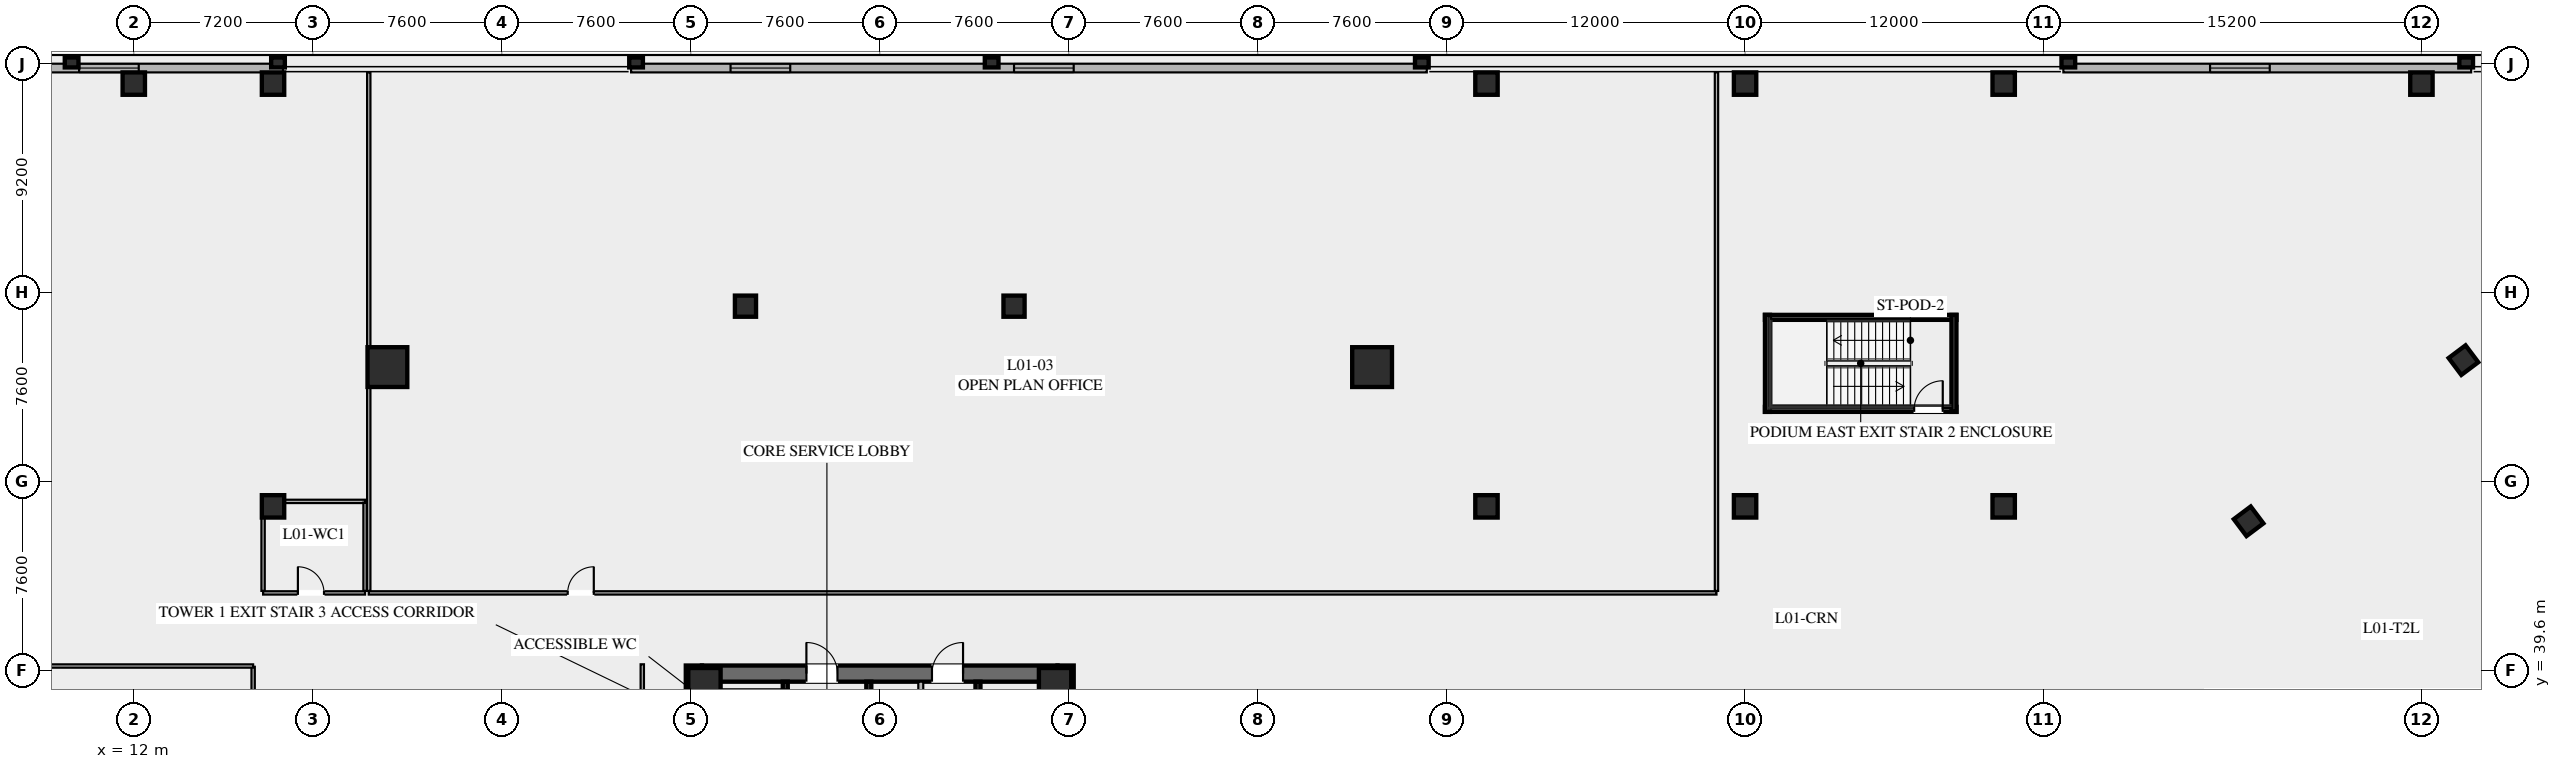
"""IFC4 building model, lengths in metres.
Left out: names, types, materials, properties, quantities, classifications, styles, units other than length and angle.
Written with IfcOpenShell. Run it as: python <this file> out.ifc"""

import sys

from ifc_helpers import new_model, si_unit, direction, frame, frame_2d, origin, origin_2d, place, context, subcontext, project, spatial, rectangle, hollow_rectangle, extrude, element, fill, save


model = new_model("IFC4")
c1 = context("Model", 3, precision=1e-05, world=origin(), true_north=direction((0.0, 1.0)))
c2 = subcontext(c1, "Body", "Model", "MODEL_VIEW")
j1 = project(units=[si_unit("LENGTHUNIT", "METRE"), si_unit("PLANEANGLEUNIT", "RADIAN")], contexts=[c1])
p1 = place(None, origin())
s1 = spatial("IfcSite", under=j1, at=p1, CompositionType="ELEMENT")
p2 = place(p1, origin())
s2 = spatial("IfcBuilding", under=s1, at=p2, CompositionType="ELEMENT")
p3 = place(p2, frame((0.0, 0.0, 5.4)))
s3 = spatial("IfcBuildingStorey", under=s2, at=p3, CompositionType="ELEMENT", Elevation=5.4)
for number, where, z_axis, x_axis in (
    (1, (34.525, 24.2, 0.0), (0.0, 0.0, 1.0), (0.0, 1.0, 0.0)),
    (2, (49.475, 39.8, 0.0), (0.0, 0.0, 1.0), (0.0, -1.0, 0.0)),
):
    element("IfcWall", number, at=place(p3, frame(where, z_axis=z_axis, x_axis=x_axis)), inside=s3, PredefinedType="SHEAR", context=c2, shape_type="SweptSolid", body=[
        extrude(rectangle(XDim=15.6, YDim=0.65, at=frame_2d((7.8, 0.0))), origin(), (0.0, 0.0, 1.0), 4.8),
    ])
p4 = place(p3, frame((34.85, 39.475, 0.0), z_axis=(0.0, 0.0, 1.0), x_axis=(1.0, 0.0, 0.0)))
e3 = element("IfcWall", 3, at=p4, inside=s3, PredefinedType="SHEAR", context=c2, shape_type="SweptSolid", body=[
    extrude(rectangle(XDim=14.3, YDim=0.65, at=frame_2d((7.15, 0.0))), origin(), (0.0, 0.0, 1.0), 4.8),
])
p5 = place(p4, frame((4.2, 0.0, 0.0)))
e4 = element("IfcOpeningElement", 4, at=p5, cuts=e3, PredefinedType="OPENING", context=c2, shape_type="SweptSolid", body=[
    extrude(rectangle(XDim=1.25, YDim=2.25, at=frame_2d((0.625, 1.125))), frame((0.0, 0.335, 0.0), z_axis=(0.0, -1.0, 0.0), x_axis=(1.0, 0.0, 0.0)), (0.0, 0.0, 1.0), 0.67),
])
p6 = place(p4, frame((9.25, 0.0, 0.0)))
e5 = element("IfcOpeningElement", 5, at=p6, cuts=e3, PredefinedType="OPENING", context=c2, shape_type="SweptSolid", body=[
    extrude(rectangle(XDim=1.25, YDim=2.25, at=frame_2d((0.625, 1.125))), frame((0.0, 0.335, 0.0), z_axis=(0.0, -1.0, 0.0), x_axis=(1.0, 0.0, 0.0)), (0.0, 0.0, 1.0), 0.67),
])
for number, where, z_axis, x_axis in (
    (6, (49.05, 39.05, 0.0), (0.0, 0.0, 1.0), (1.0, 0.0, 0.0)),
    (7, (34.95, 39.05, 0.0), (0.0, 0.0, 1.0), (1.0, 0.0, 0.0)),
):
    element("IfcColumn", number, at=place(p3, frame(where, z_axis=z_axis, x_axis=x_axis)), inside=s3, PredefinedType="COLUMN", context=c2, shape_type="SweptSolid", body=[
        extrude(hollow_rectangle(XDim=1.3, YDim=1.3, WallThickness=0.05, at=origin_2d()), origin(), (0.0, 0.0, 1.0), 4.54),
    ])
for number, where, z_axis, x_axis in (
    (8, (61.8, 51.8, 0.0), (0.0, 0.0, 1.0), (1.0, 0.0, 0.0)),
    (9, (22.2, 51.8, 0.0), (0.0, 0.0, 1.0), (1.0, 0.0, 0.0)),
):
    element("IfcColumn", number, at=place(p3, frame(where, z_axis=z_axis, x_axis=x_axis)), inside=s3, PredefinedType="COLUMN", context=c2, shape_type="SweptSolid", body=[
        extrude(hollow_rectangle(XDim=1.6, YDim=1.6, WallThickness=0.06, at=origin_2d()), origin(), (0.0, 0.0, 1.0), 4.54),
    ])
for number, where, z_axis, x_axis in (
    (10, (47.4, 54.25, 0.0), (0.0, 0.0, 1.0), (1.0, 0.0, 0.0)),
    (11, (36.6, 54.25, 0.0), (0.0, 0.0, 1.0), (1.0, 0.0, 0.0)),
):
    element("IfcColumn", number, at=place(p3, frame(where, z_axis=z_axis, x_axis=x_axis)), inside=s3, PredefinedType="COLUMN", context=c2, shape_type="SweptSolid", body=[
        extrude(hollow_rectangle(XDim=0.85, YDim=0.85, WallThickness=0.035, at=origin_2d()), origin(), (0.0, 0.0, 1.0), 4.54),
    ])
p7 = place(p3, frame((103.571, 33.522, 0.0), z_axis=(0.0, 0.0, 1.0), x_axis=(0.799998028465, 0.600002628705, 0.0)))
e12 = element("IfcWall", 12, at=p7, inside=s3, PredefinedType="SHEAR", context=c2, shape_type="SweptSolid", body=[
    extrude(rectangle(XDim=14.86, YDim=0.65, at=frame_2d((7.43, 0.0))), origin(), (0.0, 0.0, 1.0), 4.8),
])
p8 = place(p7, frame((4.48, 0.0, 0.0)))
e13 = element("IfcOpeningElement", 13, at=p8, cuts=e12, PredefinedType="OPENING", context=c2, shape_type="SweptSolid", body=[
    extrude(rectangle(XDim=1.25, YDim=2.25, at=frame_2d((0.625, 1.125))), frame((0.0, 0.335, 0.0), z_axis=(0.0, -1.0, 0.0), x_axis=(1.0, 0.0, 0.0)), (0.0, 0.0, 1.0), 0.67),
])
p9 = place(p7, frame((9.53, 0.0, 0.0)))
e14 = element("IfcOpeningElement", 14, at=p9, cuts=e12, PredefinedType="OPENING", context=c2, shape_type="SweptSolid", body=[
    extrude(rectangle(XDim=1.25, YDim=2.25, at=frame_2d((0.625, 1.125))), frame((0.0, 0.335, 0.0), z_axis=(0.0, -1.0, 0.0), x_axis=(1.0, 0.0, 0.0)), (0.0, 0.0, 1.0), 0.67),
])
for number, where, z_axis, x_axis in (
    (15, (105.69, 52.08, 0.0), (0.0, 0.0, 1.0), (0.8, 0.6, 0.0)),
    (16, (97.05, 45.6, 0.0), (0.0, 0.0, 1.0), (0.8, 0.6, 0.0)),
):
    element("IfcColumn", number, at=place(p3, frame(where, z_axis=z_axis, x_axis=x_axis)), inside=s3, PredefinedType="COLUMN", context=c2, shape_type="SweptSolid", body=[
        extrude(hollow_rectangle(XDim=0.85, YDim=0.85, WallThickness=0.035, at=origin_2d()), origin(), (0.0, 0.0, 1.0), 4.54),
    ])
for number, where, z_axis, x_axis in (
    (17, (12.0, 63.2, 0.0), (0.0, 0.0, 1.0), (1.0, 0.0, 0.0)),
    (18, (17.6, 63.2, 0.0), (0.0, 0.0, 1.0), (1.0, 0.0, 0.0)),
    (19, (66.4, 63.2, 0.0), (0.0, 0.0, 1.0), (1.0, 0.0, 0.0)),
    (20, (76.8, 63.2, 0.0), (0.0, 0.0, 1.0), (1.0, 0.0, 0.0)),
    (21, (87.2, 63.2, 0.0), (0.0, 0.0, 1.0), (1.0, 0.0, 0.0)),
    (22, (104.0, 63.2, 0.0), (0.0, 0.0, 1.0), (1.0, 0.0, 0.0)),
    (23, (17.6, 46.2, 0.0), (0.0, 0.0, 1.0), (1.0, 0.0, 0.0)),
    (24, (66.4, 46.2, 0.0), (0.0, 0.0, 1.0), (1.0, 0.0, 0.0)),
    (25, (76.8, 46.2, 0.0), (0.0, 0.0, 1.0), (1.0, 0.0, 0.0)),
    (26, (87.2, 46.2, 0.0), (0.0, 0.0, 1.0), (1.0, 0.0, 0.0)),
):
    element("IfcColumn", number, at=place(p3, frame(where, z_axis=z_axis, x_axis=x_axis)), inside=s3, PredefinedType="COLUMN", context=c2, shape_type="SweptSolid", body=[
        extrude(rectangle(XDim=0.9, YDim=0.9, at=origin_2d()), origin(), (0.0, 0.0, 1.0), 4.54),
    ])
p10 = place(p3, frame((0.0, 63.825, 0.0), z_axis=(0.0, 0.0, 1.0), x_axis=(1.0, 0.0, 0.0)))
e27 = element("IfcWall", 27, at=p10, inside=s3, PredefinedType="SOLIDWALL", context=c2, shape_type="SweptSolid", body=[
    extrude(rectangle(XDim=18.0, YDim=0.35, at=frame_2d((9.0, 0.0))), origin(), (0.0, 0.0, 1.0), 4.54),
])
p11 = place(p10, frame((4.2, 0.0, 0.95)))
e28 = element("IfcOpeningElement", 28, at=p11, cuts=e27, PredefinedType="OPENING", context=c2, shape_type="SweptSolid", body=[
    extrude(rectangle(XDim=2.4, YDim=2.2, at=frame_2d((1.2, 1.1))), frame((0.0, 0.185, 0.0), z_axis=(0.0, -1.0, 0.0), x_axis=(1.0, 0.0, 0.0)), (0.0, 0.0, 1.0), 0.37),
])
p12 = place(p10, frame((9.8, 0.0, 0.95)))
e29 = element("IfcOpeningElement", 29, at=p12, cuts=e27, PredefinedType="OPENING", context=c2, shape_type="SweptSolid", body=[
    extrude(rectangle(XDim=2.4, YDim=2.2, at=frame_2d((1.2, 1.1))), frame((0.0, 0.185, 0.0), z_axis=(0.0, -1.0, 0.0), x_axis=(1.0, 0.0, 0.0)), (0.0, 0.0, 1.0), 0.37),
])
p13 = place(p3, frame((32.0, 63.825, 0.0), z_axis=(0.0, 0.0, 1.0), x_axis=(1.0, 0.0, 0.0)))
e30 = element("IfcWall", 30, at=p13, inside=s3, PredefinedType="SOLIDWALL", context=c2, shape_type="SweptSolid", body=[
    extrude(rectangle(XDim=32.0, YDim=0.35, at=frame_2d((16.0, 0.0))), origin(), (0.0, 0.0, 1.0), 4.54),
])
p14 = place(p13, frame((4.0, 0.0, 0.95)))
e31 = element("IfcOpeningElement", 31, at=p14, cuts=e30, PredefinedType="OPENING", context=c2, shape_type="SweptSolid", body=[
    extrude(rectangle(XDim=2.4, YDim=2.2, at=frame_2d((1.2, 1.1))), frame((0.0, 0.185, 0.0), z_axis=(0.0, -1.0, 0.0), x_axis=(1.0, 0.0, 0.0)), (0.0, 0.0, 1.0), 0.37),
])
p15 = place(p13, frame((15.4, 0.0, 0.95)))
e32 = element("IfcOpeningElement", 32, at=p15, cuts=e30, PredefinedType="OPENING", context=c2, shape_type="SweptSolid", body=[
    extrude(rectangle(XDim=2.4, YDim=2.2, at=frame_2d((1.2, 1.1))), frame((0.0, 0.185, 0.0), z_axis=(0.0, -1.0, 0.0), x_axis=(1.0, 0.0, 0.0)), (0.0, 0.0, 1.0), 0.37),
])
p16 = place(p3, frame((89.6, 63.825, 0.0), z_axis=(0.0, 0.0, 1.0), x_axis=(1.0, 0.0, 0.0)))
e33 = element("IfcWall", 33, at=p16, inside=s3, PredefinedType="SOLIDWALL", context=c2, shape_type="SweptSolid", body=[
    extrude(rectangle(XDim=16.4, YDim=0.35, at=frame_2d((8.2, 0.0))), origin(), (0.0, 0.0, 1.0), 4.54),
])
p17 = place(p16, frame((5.9, 0.0, 0.95)))
e34 = element("IfcOpeningElement", 34, at=p17, cuts=e33, PredefinedType="OPENING", context=c2, shape_type="SweptSolid", body=[
    extrude(rectangle(XDim=2.4, YDim=2.2, at=frame_2d((1.2, 1.1))), frame((0.0, 0.185, 0.0), z_axis=(0.0, -1.0, 0.0), x_axis=(1.0, 0.0, 0.0)), (0.0, 0.0, 1.0), 0.37),
])
for number, where, z_axis, x_axis in (
    (35, (9.5, 64.05, 0.0), (0.0, 0.0, 1.0), (1.0, 0.0, 0.0)),
    (36, (17.8, 64.05, 0.0), (0.0, 0.0, 1.0), (1.0, 0.0, 0.0)),
    (37, (32.2, 64.05, 0.0), (0.0, 0.0, 1.0), (1.0, 0.0, 0.0)),
    (38, (46.5, 64.05, 0.0), (0.0, 0.0, 1.0), (1.0, 0.0, 0.0)),
    (39, (63.8, 64.05, 0.0), (0.0, 0.0, 1.0), (1.0, 0.0, 0.0)),
    (40, (89.8, 64.05, 0.0), (0.0, 0.0, 1.0), (1.0, 0.0, 0.0)),
    (41, (105.8, 64.05, 0.0), (0.0, 0.0, 1.0), (1.0, 0.0, 0.0)),
):
    element("IfcColumn", number, at=place(p3, frame(where, z_axis=z_axis, x_axis=x_axis)), inside=s3, PredefinedType="PILASTER", context=c2, shape_type="SweptSolid", body=[
        extrude(rectangle(XDim=0.55, YDim=0.4, at=origin_2d()), origin(), (0.0, 0.0, 1.0), 4.54),
    ])
p18 = place(p3, frame((38.2, 31.2, 0.0), z_axis=(0.0, 0.0, 1.0), x_axis=(0.0, 1.0, 0.0)))
e42 = element("IfcWall", 42, at=p18, inside=s3, PredefinedType="SHEAR", context=c2, shape_type="SweptSolid", body=[
    extrude(rectangle(XDim=7.95, YDim=0.2, at=frame_2d((3.975, 0.0))), origin(), (0.0, 0.0, 1.0), 4.54),
])
p19 = place(p18, frame((0.45, 0.0, 0.0)))
e43 = element("IfcOpeningElement", 43, at=p19, cuts=e42, PredefinedType="OPENING", context=c2, shape_type="SweptSolid", body=[
    extrude(rectangle(XDim=1.15, YDim=2.2, at=frame_2d((0.575, 1.1))), frame((0.0, 0.11, 0.0), z_axis=(0.0, -1.0, 0.0), x_axis=(1.0, 0.0, 0.0)), (0.0, 0.0, 1.0), 0.22),
])
p20 = place(p3, frame((41.56, 24.85, 0.0), z_axis=(0.0, 0.0, 1.0), x_axis=(0.0, 1.0, 0.0)))
e44 = element("IfcWall", 44, at=p20, inside=s3, PredefinedType="SHEAR", context=c2, shape_type="SweptSolid", body=[
    extrude(rectangle(XDim=14.3, YDim=0.2, at=frame_2d((7.15, 0.0))), origin(), (0.0, 0.0, 1.0), 4.54),
])
p21 = place(p3, frame((45.95, 39.15, 0.0), z_axis=(0.0, 0.0, 1.0), x_axis=(0.0, -1.0, 0.0)))
e45 = element("IfcWall", 45, at=p21, inside=s3, PredefinedType="SHEAR", context=c2, shape_type="SweptSolid", body=[
    extrude(rectangle(XDim=6.35, YDim=0.2, at=frame_2d((3.175, 0.0))), origin(), (0.0, 0.0, 1.0), 4.54),
])
p22 = place(p3, frame((43.65, 32.35, 0.0), z_axis=(0.0, 0.0, 1.0), x_axis=(0.0, 1.0, 0.0)))
e46 = element("IfcWall", 46, at=p22, inside=s3, PredefinedType="SOLIDWALL", context=c2, shape_type="SweptSolid", body=[
    extrude(rectangle(XDim=6.8, YDim=0.2, at=frame_2d((3.4, 0.0))), origin(), (0.0, 0.0, 1.0), 4.54),
])
p23 = place(p3, frame((32.45, 35.4, 0.0), z_axis=(0.0, 0.0, 1.0), x_axis=(0.0, 1.0, 0.0)))
e47 = element("IfcWall", 47, at=p23, inside=s3, PredefinedType="PARTITIONING", context=c2, shape_type="SweptSolid", body=[
    extrude(rectangle(XDim=4.45, YDim=0.135, at=frame_2d((2.225, 0.0))), origin(), (0.0, 0.0, 1.0), 3.583),
])
p24 = place(p3, frame((77.6, 50.1, 0.0), z_axis=(0.0, 0.0, 1.0), x_axis=(1.0, 0.0, 0.0)))
e48 = element("IfcWall", 48, at=p24, inside=s3, PredefinedType="SHEAR", context=c2, shape_type="SweptSolid", body=[
    extrude(rectangle(XDim=7.7, YDim=0.2, at=frame_2d((3.85, 0.0))), origin(), (0.0, 0.0, 1.0), 4.54),
])
p25 = place(p24, frame((6.0, 0.0, 0.0)))
e49 = element("IfcOpeningElement", 49, at=p25, cuts=e48, PredefinedType="OPENING", context=c2, shape_type="SweptSolid", body=[
    extrude(rectangle(XDim=1.15, YDim=2.2, at=frame_2d((0.575, 1.1))), frame((0.0, 0.11, 0.0), z_axis=(0.0, -1.0, 0.0), x_axis=(1.0, 0.0, 0.0)), (0.0, 0.0, 1.0), 0.22),
])
p26 = place(p3, frame((77.6, 53.8, 0.0), z_axis=(0.0, 0.0, 1.0), x_axis=(1.0, 0.0, 0.0)))
e50 = element("IfcWall", 50, at=p26, inside=s3, PredefinedType="SHEAR", context=c2, shape_type="SweptSolid", body=[
    extrude(rectangle(XDim=7.7, YDim=0.2, at=frame_2d((3.85, 0.0))), origin(), (0.0, 0.0, 1.0), 4.54),
])
for number, where, z_axis, x_axis in (
    (51, (77.7, 50.0, 0.0), (0.0, 0.0, 1.0), (0.0, 1.0, 0.0)),
    (52, (85.2, 50.0, 0.0), (0.0, 0.0, 1.0), (0.0, 1.0, 0.0)),
):
    element("IfcWall", number, at=place(p3, frame(where, z_axis=z_axis, x_axis=x_axis)), inside=s3, PredefinedType="SHEAR", context=c2, shape_type="SweptSolid", body=[
        extrude(rectangle(XDim=3.9, YDim=0.2, at=frame_2d((1.95, 0.0))), origin(), (0.0, 0.0, 1.0), 4.54),
    ])
p27 = place(p3, frame((16.8, 24.35, 0.0), z_axis=(0.0, 0.0, 1.0), x_axis=(0.0, 1.0, 0.0)))
e53 = element("IfcWall", 53, at=p27, inside=s3, PredefinedType="PARTITIONING", context=c2, shape_type="SweptSolid", body=[
    extrude(rectangle(XDim=15.4, YDim=0.135, at=frame_2d((7.7, 0.0))), origin(), (0.0, 0.0, 1.0), 3.583),
])
p28 = place(p3, frame((0.35, 39.78, 0.0), z_axis=(0.0, 0.0, 1.0), x_axis=(1.0, 0.0, 0.0)))
e54 = element("IfcWall", 54, at=p28, inside=s3, PredefinedType="PARTITIONING", context=c2, shape_type="SweptSolid", body=[
    extrude(rectangle(XDim=16.45, YDim=0.135, at=frame_2d((8.225, 0.0))), origin(), (0.0, 0.0, 1.0), 3.583),
])
p29 = place(p3, frame((21.45, 42.72, 0.0), z_axis=(0.0, 0.0, 1.0), x_axis=(1.0, 0.0, 0.0)))
e55 = element("IfcWall", 55, at=p29, inside=s3, PredefinedType="PARTITIONING", context=c2, shape_type="SweptSolid", body=[
    extrude(rectangle(XDim=54.2, YDim=0.135, at=frame_2d((27.1, 0.0))), origin(), (0.0, 0.0, 1.0), 3.583),
])
p30 = place(p29, frame((8.0, 0.0, 0.0)))
e56 = element("IfcOpeningElement", 56, at=p30, cuts=e55, PredefinedType="OPENING", context=c2, shape_type="SweptSolid", body=[
    extrude(rectangle(XDim=1.05, YDim=2.2, at=frame_2d((0.525, 1.1))), frame((0.0, 0.077, 0.0), z_axis=(0.0, -1.0, 0.0), x_axis=(1.0, 0.0, 0.0)), (0.0, 0.0, 1.0), 0.155),
])
for number, where, z_axis, x_axis in (
    (57, (21.45, 42.8, 0.0), (0.0, 0.0, 1.0), (0.0, 1.0, 0.0)),
    (58, (75.65, 42.8, 0.0), (0.0, 0.0, 1.0), (0.0, 1.0, 0.0)),
):
    element("IfcWall", number, at=place(p3, frame(where, z_axis=z_axis, x_axis=x_axis)), inside=s3, PredefinedType="PARTITIONING", context=c2, shape_type="SweptSolid", body=[
        extrude(rectangle(XDim=20.85, YDim=0.135, at=frame_2d((10.425, 0.0))), origin(), (0.0, 0.0, 1.0), 3.583),
    ])
p31 = place(p3, frame((17.2, 42.72, 0.0), z_axis=(0.0, 0.0, 1.0), x_axis=(1.0, 0.0, 0.0)))
e59 = element("IfcWall", 59, at=p31, inside=s3, PredefinedType="PARTITIONING", context=c2, shape_type="SweptSolid", body=[
    extrude(rectangle(XDim=4.1, YDim=0.135, at=frame_2d((2.05, 0.0))), origin(), (0.0, 0.0, 1.0), 3.583),
])
p32 = place(p31, frame((1.4, 0.0, 0.0)))
e60 = element("IfcOpeningElement", 60, at=p32, cuts=e59, PredefinedType="OPENING", context=c2, shape_type="SweptSolid", body=[
    extrude(rectangle(XDim=1.05, YDim=2.2, at=frame_2d((0.525, 1.1))), frame((0.0, 0.077, 0.0), z_axis=(0.0, -1.0, 0.0), x_axis=(1.0, 0.0, 0.0)), (0.0, 0.0, 1.0), 0.155),
])
p33 = place(p3, frame((17.2, 46.4, 0.0), z_axis=(0.0, 0.0, 1.0), x_axis=(1.0, 0.0, 0.0)))
e61 = element("IfcWall", 61, at=p33, inside=s3, PredefinedType="PARTITIONING", context=c2, shape_type="SweptSolid", body=[
    extrude(rectangle(XDim=4.1, YDim=0.135, at=frame_2d((2.05, 0.0))), origin(), (0.0, 0.0, 1.0), 3.583),
])
for number, where, z_axis, x_axis in (
    (62, (17.2, 42.8, 0.0), (0.0, 0.0, 1.0), (0.0, 1.0, 0.0)),
    (63, (21.3, 42.8, 0.0), (0.0, 0.0, 1.0), (0.0, 1.0, 0.0)),
):
    element("IfcWall", number, at=place(p3, frame(where, z_axis=z_axis, x_axis=x_axis)), inside=s3, PredefinedType="PARTITIONING", context=c2, shape_type="SweptSolid", body=[
        extrude(rectangle(XDim=3.55, YDim=0.135, at=frame_2d((1.775, 0.0))), origin(), (0.0, 0.0, 1.0), 3.583),
    ])
p34 = place(p12, origin())
e64 = element("IfcWindow", 64, at=p34, inside=s3, PartitioningType="SINGLE_PANEL", PredefinedType="WINDOW", context=c2, shape_type="SweptSolid", body=[
    extrude(rectangle(XDim=2.4, YDim=2.2, at=frame_2d((1.2, 1.1))), frame((0.0, 0.03, 0.0), z_axis=(0.0, -1.0, 0.0), x_axis=(1.0, 0.0, 0.0)), (0.0, 0.0, 1.0), 0.06),
])
fill(e29, e64)
p35 = place(p14, origin())
e65 = element("IfcWindow", 65, at=p35, inside=s3, PartitioningType="SINGLE_PANEL", PredefinedType="WINDOW", context=c2, shape_type="SweptSolid", body=[
    extrude(rectangle(XDim=2.4, YDim=2.2, at=frame_2d((1.2, 1.1))), frame((0.0, 0.03, 0.0), z_axis=(0.0, -1.0, 0.0), x_axis=(1.0, 0.0, 0.0)), (0.0, 0.0, 1.0), 0.06),
])
fill(e31, e65)
p36 = place(p15, origin())
e66 = element("IfcWindow", 66, at=p36, inside=s3, PartitioningType="SINGLE_PANEL", PredefinedType="WINDOW", context=c2, shape_type="SweptSolid", body=[
    extrude(rectangle(XDim=2.4, YDim=2.2, at=frame_2d((1.2, 1.1))), frame((0.0, 0.03, 0.0), z_axis=(0.0, -1.0, 0.0), x_axis=(1.0, 0.0, 0.0)), (0.0, 0.0, 1.0), 0.06),
])
fill(e32, e66)
p37 = place(p17, origin())
e67 = element("IfcWindow", 67, at=p37, inside=s3, PartitioningType="SINGLE_PANEL", PredefinedType="WINDOW", context=c2, shape_type="SweptSolid", body=[
    extrude(rectangle(XDim=2.4, YDim=2.2, at=frame_2d((1.2, 1.1))), frame((0.0, 0.03, 0.0), z_axis=(0.0, -1.0, 0.0), x_axis=(1.0, 0.0, 0.0)), (0.0, 0.0, 1.0), 0.06),
])
fill(e34, e67)
p38 = place(p5, origin())
e68 = element("IfcDoor", 68, at=p38, inside=s3, OperationType="SINGLE_SWING_LEFT", PredefinedType="DOOR", context=c2, shape_type="SweptSolid", body=[
    extrude(rectangle(XDim=1.25, YDim=2.25, at=frame_2d((0.625, 1.125))), frame((0.0, 0.025, 0.0), z_axis=(0.0, -1.0, 0.0), x_axis=(1.0, 0.0, 0.0)), (0.0, 0.0, 1.0), 0.05),
])
fill(e4, e68)
p39 = place(p6, origin())
e69 = element("IfcDoor", 69, at=p39, inside=s3, OperationType="SINGLE_SWING_RIGHT", PredefinedType="DOOR", context=c2, shape_type="SweptSolid", body=[
    extrude(rectangle(XDim=1.25, YDim=2.25, at=frame_2d((0.625, 1.125))), frame((0.0, 0.025, 0.0), z_axis=(0.0, -1.0, 0.0), x_axis=(1.0, 0.0, 0.0)), (0.0, 0.0, 1.0), 0.05),
])
fill(e5, e69)
p40 = place(p25, origin())
e70 = element("IfcDoor", 70, at=p40, inside=s3, OperationType="SINGLE_SWING_RIGHT", PredefinedType="DOOR", context=c2, shape_type="SweptSolid", body=[
    extrude(rectangle(XDim=1.15, YDim=2.2, at=frame_2d((0.575, 1.1))), frame((0.0, 0.025, 0.0), z_axis=(0.0, -1.0, 0.0), x_axis=(1.0, 0.0, 0.0)), (0.0, 0.0, 1.0), 0.05),
])
fill(e49, e70)
p41 = place(p30, origin())
e71 = element("IfcDoor", 71, at=p41, inside=s3, OperationType="SINGLE_SWING_RIGHT", PredefinedType="DOOR", context=c2, shape_type="SweptSolid", body=[
    extrude(rectangle(XDim=1.05, YDim=2.2, at=frame_2d((0.525, 1.1))), frame((0.0, 0.025, 0.0), z_axis=(0.0, -1.0, 0.0), x_axis=(1.0, 0.0, 0.0)), (0.0, 0.0, 1.0), 0.05),
])
fill(e56, e71)
p42 = place(p32, origin())
e72 = element("IfcDoor", 72, at=p42, inside=s3, OperationType="SINGLE_SWING_LEFT", PredefinedType="DOOR", context=c2, shape_type="SweptSolid", body=[
    extrude(rectangle(XDim=1.05, YDim=2.2, at=frame_2d((0.525, 1.1))), frame((0.0, 0.025, 0.0), z_axis=(0.0, -1.0, 0.0), x_axis=(1.0, 0.0, 0.0)), (0.0, 0.0, 1.0), 0.05),
])
fill(e60, e72)
save(model, sys.argv[1])
